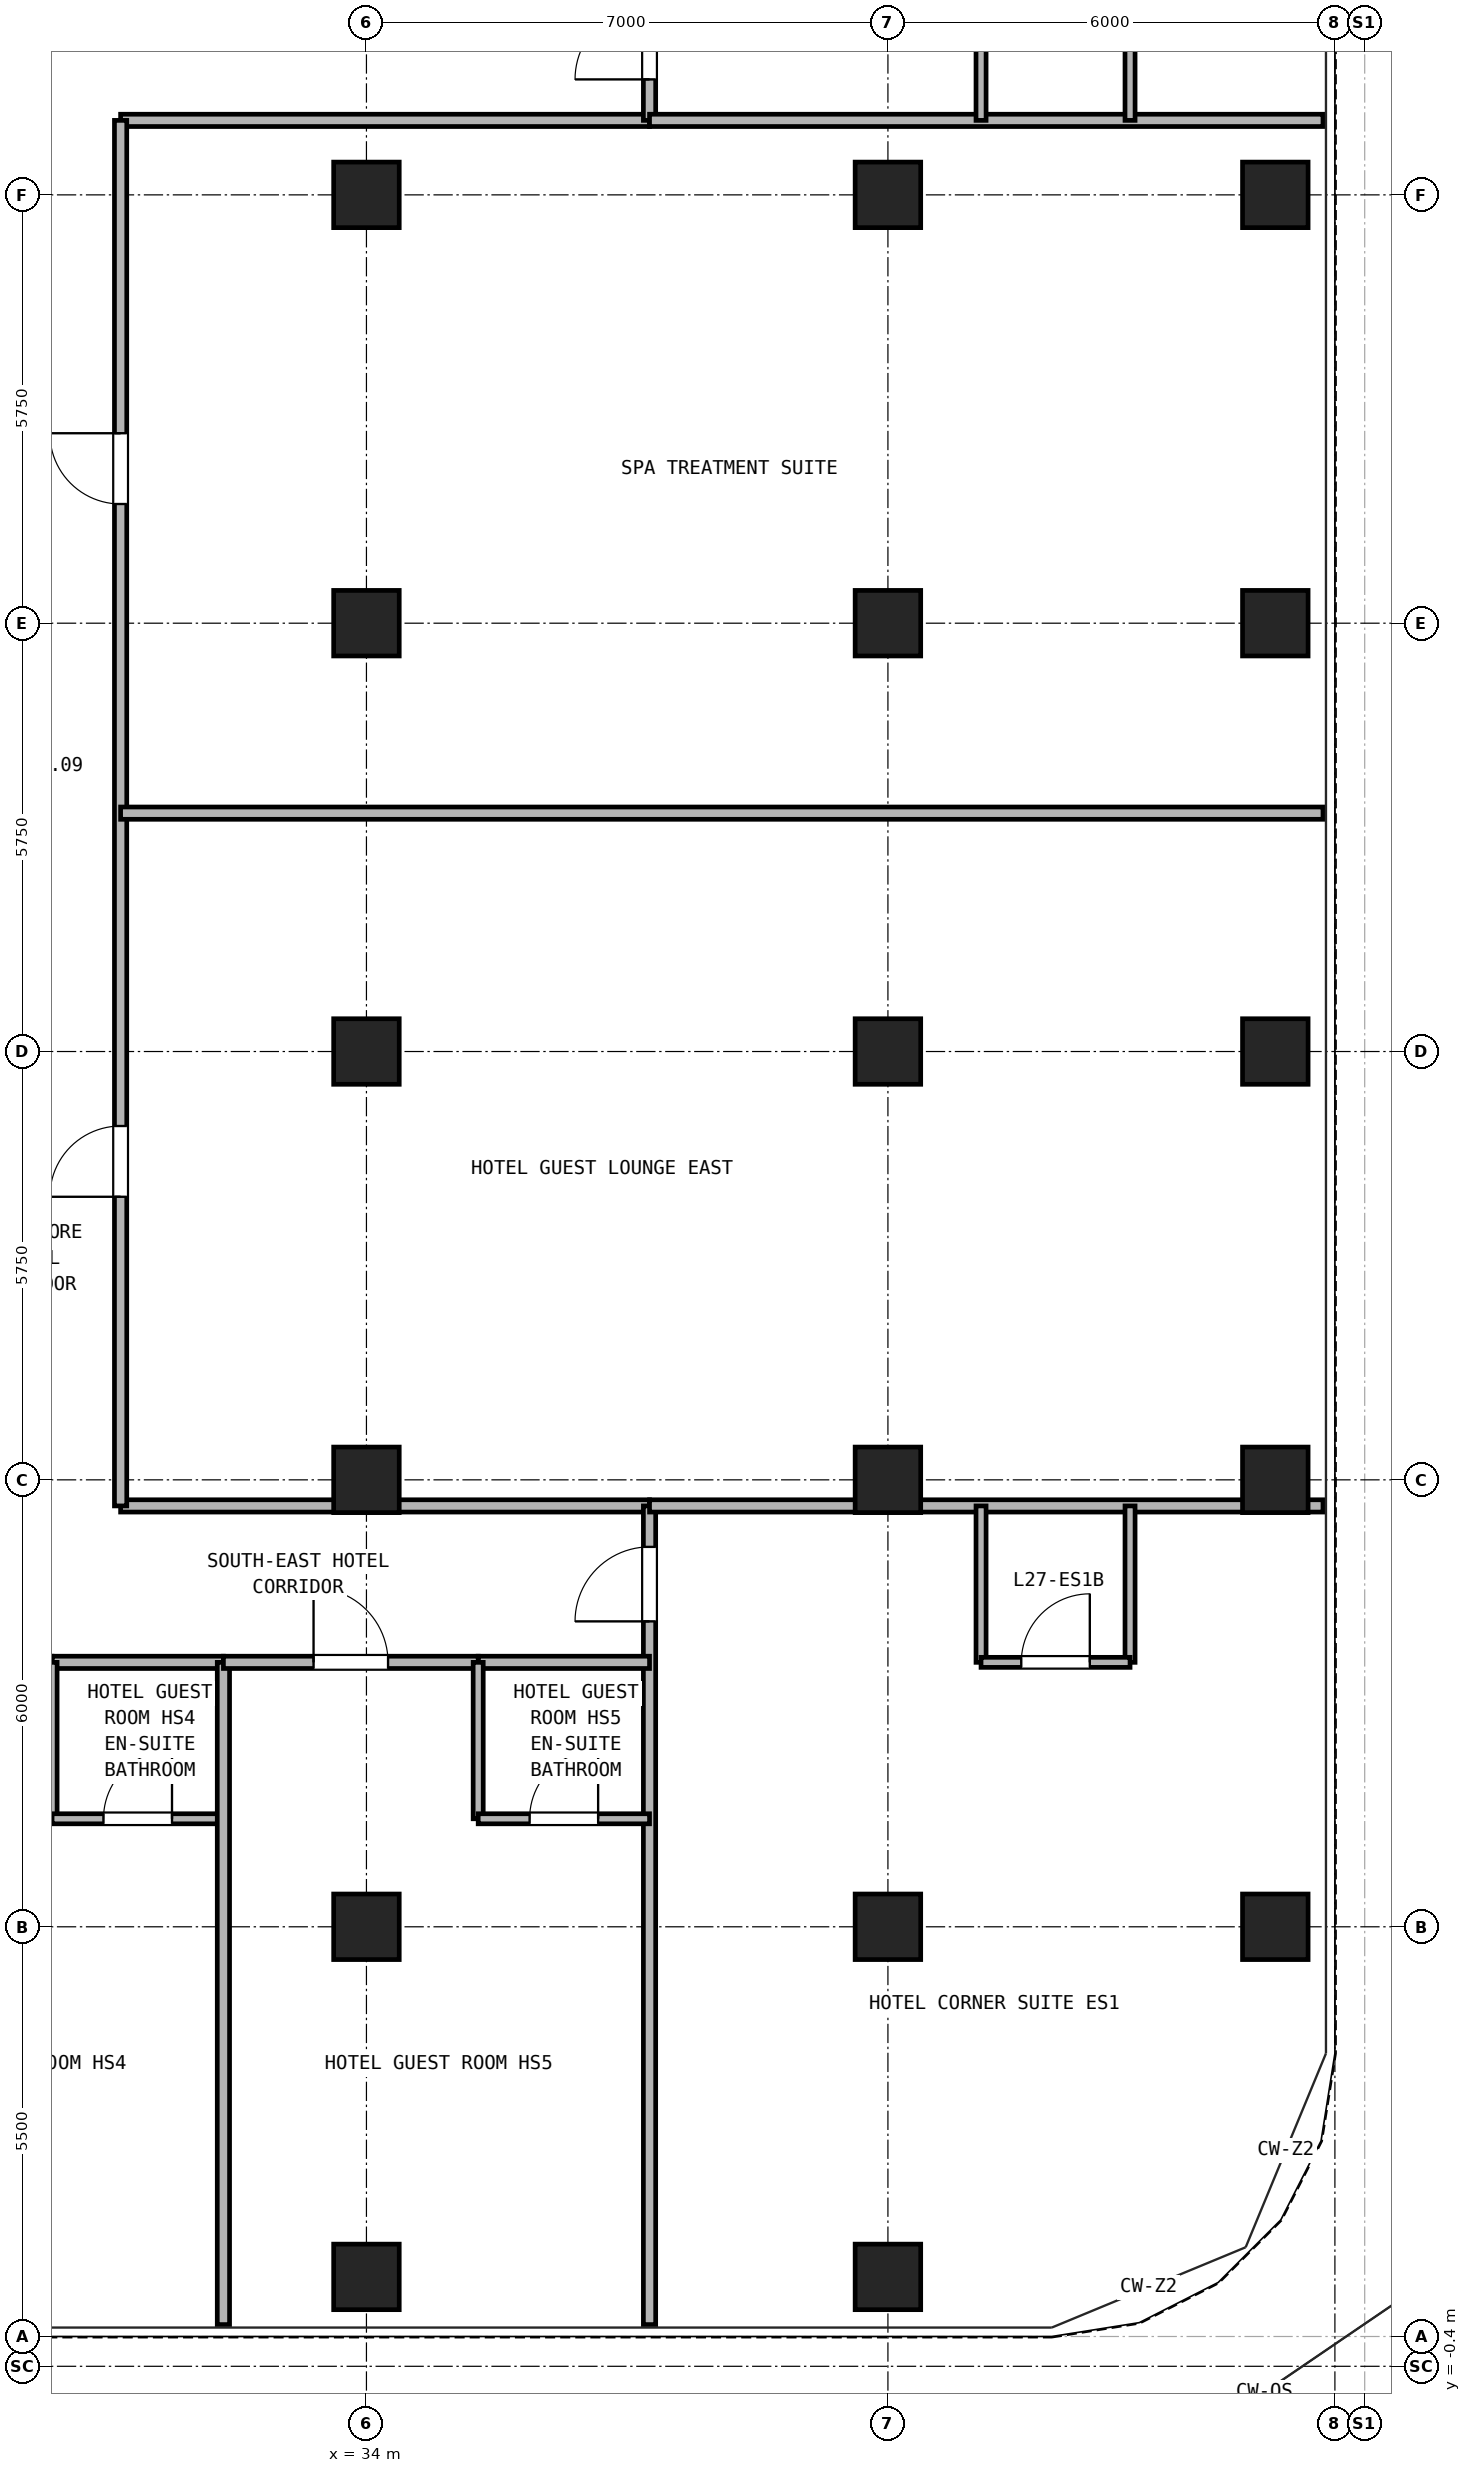
"""IFC4 building model, lengths in metres.
Left out: names, types, materials, properties, quantities, classifications, styles, units other than length and angle.
Written with IfcOpenShell. Run it as: python <this file> out.ifc"""

import sys

from ifc_helpers import new_model, si_unit, direction, frame, frame_2d, origin, origin_2d, place, context, subcontext, project, spatial, rectangle, hollow_rectangle, extrude, source, transform, mapped, element, fill, save


model = new_model("IFC4")
c1 = context("Model", 3, precision=1e-05, world=origin(), true_north=direction((0.0, 1.0)))
c2 = subcontext(c1, "Body", "Model", "MODEL_VIEW")
j1 = project(units=[si_unit("LENGTHUNIT", "METRE"), si_unit("PLANEANGLEUNIT", "RADIAN")], contexts=[c1])
p1 = place(None, origin())
s1 = spatial("IfcSite", under=j1, at=p1, CompositionType="ELEMENT")
p2 = place(p1, origin())
s2 = spatial("IfcBuilding", under=s1, at=p2, CompositionType="ELEMENT")
p3 = place(p2, frame((0.0, 0.0, 102.3)))
s3 = spatial("IfcBuildingStorey", under=s2, at=p3, CompositionType="ELEMENT", Elevation=102.3)
m1 = source(origin(), c2, "Body", "SweptSolid", [
    extrude(hollow_rectangle(XDim=0.88, YDim=0.88, WallThickness=0.05, at=origin_2d()), origin(), (0.0, 0.0, 1.0), 2.95),
])
for number, where, z_axis, x_axis in (
    (1, (34.0, 0.8, 0.0), (0.0, 0.0, 1.0), (1.0, 0.0, 0.0)),
    (2, (41.0, 0.8, 0.0), (0.0, 0.0, 1.0), (1.0, 0.0, 0.0)),
    (3, (46.2, 5.5, 0.0), (0.0, 0.0, 1.0), (1.0, 0.0, 0.0)),
    (4, (46.2, 11.5, 0.0), (0.0, 0.0, 1.0), (1.0, 0.0, 0.0)),
    (5, (46.2, 17.25, 0.0), (0.0, 0.0, 1.0), (1.0, 0.0, 0.0)),
    (6, (46.2, 23.0, 0.0), (0.0, 0.0, 1.0), (1.0, 0.0, 0.0)),
    (7, (46.2, 28.75, 0.0), (0.0, 0.0, 1.0), (1.0, 0.0, 0.0)),
    (8, (34.0, 5.5, 0.0), (0.0, 0.0, 1.0), (1.0, 0.0, 0.0)),
    (9, (34.0, 11.5, 0.0), (0.0, 0.0, 1.0), (1.0, 0.0, 0.0)),
    (10, (34.0, 17.25, 0.0), (0.0, 0.0, 1.0), (1.0, 0.0, 0.0)),
    (11, (34.0, 23.0, 0.0), (0.0, 0.0, 1.0), (1.0, 0.0, 0.0)),
    (12, (34.0, 28.75, 0.0), (0.0, 0.0, 1.0), (1.0, 0.0, 0.0)),
    (13, (41.0, 5.5, 0.0), (0.0, 0.0, 1.0), (1.0, 0.0, 0.0)),
    (14, (41.0, 11.5, 0.0), (0.0, 0.0, 1.0), (1.0, 0.0, 0.0)),
    (15, (41.0, 17.25, 0.0), (0.0, 0.0, 1.0), (1.0, 0.0, 0.0)),
    (16, (41.0, 23.0, 0.0), (0.0, 0.0, 1.0), (1.0, 0.0, 0.0)),
    (17, (41.0, 28.75, 0.0), (0.0, 0.0, 1.0), (1.0, 0.0, 0.0)),
):
    element("IfcColumn", number, at=place(p3, frame(where, z_axis=z_axis, x_axis=x_axis)), inside=s3, PredefinedType="COLUMN", context=c2, shape_type="MappedRepresentation", body=[
        mapped(m1, transform((0.0, 0.0, 0.0), x_axis=(1.0, 0.0, 0.0), y_axis=(0.0, 1.0, 0.0), z_axis=(0.0, 0.0, 1.0), scale=1.0)),
    ])
for number, where, z_axis, x_axis in (
    (18, (30.7, 11.15, 0.0), (0.0, 0.0, 1.0), (1.0, 0.0, 0.0)),
    (19, (30.7, 29.75, 0.0), (0.0, 0.0, 1.0), (1.0, 0.0, 0.0)),
):
    element("IfcWall", number, at=place(p3, frame(where, z_axis=z_axis, x_axis=x_axis)), inside=s3, PredefinedType="PARTITIONING", context=c2, shape_type="SweptSolid", body=[
        extrude(rectangle(XDim=7.1, YDim=0.165, at=frame_2d((3.55, 0.0))), origin(), (0.0, 0.0, 1.0), 2.95),
    ])
p4 = place(p3, frame((30.7, 11.15, 0.0), z_axis=(0.0, 0.0, 1.0), x_axis=(0.0, 1.0, 0.0)))
e20 = element("IfcWall", 20, at=p4, inside=s3, PredefinedType="PARTITIONING", context=c2, shape_type="SweptSolid", body=[
    extrude(rectangle(XDim=18.6, YDim=0.165, at=frame_2d((9.3, 0.0))), origin(), (0.0, 0.0, 1.0), 2.95),
])
p5 = place(p4, frame((4.15, 0.0, 0.0)))
e21 = element("IfcOpeningElement", 21, at=p5, cuts=e20, PredefinedType="OPENING", context=c2, shape_type="SweptSolid", body=[
    extrude(rectangle(XDim=0.95, YDim=2.15, at=frame_2d((0.475, 1.075))), frame((0.0, 0.093, 0.0), z_axis=(0.0, -1.0, 0.0), x_axis=(1.0, 0.0, 0.0)), (0.0, 0.0, 1.0), 0.185),
])
p6 = place(p4, frame((13.45, 0.0, 0.0)))
e22 = element("IfcOpeningElement", 22, at=p6, cuts=e20, PredefinedType="OPENING", context=c2, shape_type="SweptSolid", body=[
    extrude(rectangle(XDim=0.95, YDim=2.15, at=frame_2d((0.475, 1.075))), frame((0.0, 0.093, 0.0), z_axis=(0.0, -1.0, 0.0), x_axis=(1.0, 0.0, 0.0)), (0.0, 0.0, 1.0), 0.185),
])
p7 = place(p3, frame((37.8, 0.16, 0.0), z_axis=(0.0, 0.0, 1.0), x_axis=(0.0, 1.0, 0.0)))
e23 = element("IfcWall", 23, at=p7, inside=s3, PredefinedType="PARTITIONING", context=c2, shape_type="SweptSolid", body=[
    extrude(rectangle(XDim=10.99, YDim=0.165, at=frame_2d((5.495, 0.0))), origin(), (0.0, 0.0, 1.0), 2.95),
])
p8 = place(p7, frame((9.44, 0.0, 0.0)))
e24 = element("IfcOpeningElement", 24, at=p8, cuts=e23, PredefinedType="OPENING", context=c2, shape_type="SweptSolid", body=[
    extrude(rectangle(XDim=1.0, YDim=2.15, at=frame_2d((0.5, 1.075))), frame((0.0, 0.093, 0.0), z_axis=(0.0, -1.0, 0.0), x_axis=(1.0, 0.0, 0.0)), (0.0, 0.0, 1.0), 0.185),
])
p9 = place(p3, frame((37.8, 29.75, 0.0), z_axis=(0.0, 0.0, 1.0), x_axis=(0.0, 1.0, 0.0)))
e25 = element("IfcWall", 25, at=p9, inside=s3, PredefinedType="PARTITIONING", context=c2, shape_type="SweptSolid", body=[
    extrude(rectangle(XDim=5.39, YDim=0.165, at=frame_2d((2.695, 0.0))), origin(), (0.0, 0.0, 1.0), 2.95),
])
p10 = place(p9, frame((0.55, 0.0, 0.0)))
e26 = element("IfcOpeningElement", 26, at=p10, cuts=e25, PredefinedType="OPENING", context=c2, shape_type="SweptSolid", body=[
    extrude(rectangle(XDim=1.0, YDim=2.15, at=frame_2d((0.5, 1.075))), frame((0.0, 0.093, 0.0), z_axis=(0.0, -1.0, 0.0), x_axis=(1.0, 0.0, 0.0)), (0.0, 0.0, 1.0), 0.185),
])
for number, where, z_axis, x_axis in (
    (27, (37.8, 11.15, 0.0), (0.0, 0.0, 1.0), (1.0, 0.0, 0.0)),
    (28, (37.8, 29.75, 0.0), (0.0, 0.0, 1.0), (1.0, 0.0, 0.0)),
):
    element("IfcWall", number, at=place(p3, frame(where, z_axis=z_axis, x_axis=x_axis)), inside=s3, PredefinedType="PARTITIONING", context=c2, shape_type="SweptSolid", body=[
        extrude(rectangle(XDim=9.04, YDim=0.165, at=frame_2d((4.52, 0.0))), origin(), (0.0, 0.0, 1.0), 2.95),
    ])
for number, where, z_axis, x_axis in (
    (29, (42.25, 9.05, 0.0), (0.0, 0.0, 1.0), (0.0, 1.0, 0.0)),
    (30, (44.25, 9.05, 0.0), (0.0, 0.0, 1.0), (0.0, 1.0, 0.0)),
):
    element("IfcWall", number, at=place(p3, frame(where, z_axis=z_axis, x_axis=x_axis)), inside=s3, PredefinedType="PARTITIONING", context=c2, shape_type="SweptSolid", body=[
        extrude(rectangle(XDim=2.1, YDim=0.135, at=frame_2d((1.05, 0.0))), origin(), (0.0, 0.0, 1.0), 2.95),
    ])
p11 = place(p3, frame((42.25, 9.05, 0.0), z_axis=(0.0, 0.0, 1.0), x_axis=(1.0, 0.0, 0.0)))
e31 = element("IfcWall", 31, at=p11, inside=s3, PredefinedType="PARTITIONING", context=c2, shape_type="SweptSolid", body=[
    extrude(rectangle(XDim=2.0, YDim=0.135, at=frame_2d((1.0, 0.0))), origin(), (0.0, 0.0, 1.0), 2.95),
])
p12 = place(p11, frame((0.54, 0.0, 0.0)))
e32 = element("IfcOpeningElement", 32, at=p12, cuts=e31, PredefinedType="OPENING", context=c2, shape_type="SweptSolid", body=[
    extrude(rectangle(XDim=0.92, YDim=2.1, at=frame_2d((0.46, 1.05))), frame((0.0, 0.077, 0.0), z_axis=(0.0, -1.0, 0.0), x_axis=(1.0, 0.0, 0.0)), (0.0, 0.0, 1.0), 0.155),
])
for number, where, z_axis, x_axis in (
    (33, (42.25, 29.75, 0.0), (0.0, 0.0, 1.0), (0.0, 1.0, 0.0)),
    (34, (44.25, 29.75, 0.0), (0.0, 0.0, 1.0), (0.0, 1.0, 0.0)),
):
    element("IfcWall", number, at=place(p3, frame(where, z_axis=z_axis, x_axis=x_axis)), inside=s3, PredefinedType="PARTITIONING", context=c2, shape_type="SweptSolid", body=[
        extrude(rectangle(XDim=2.1, YDim=0.135, at=frame_2d((1.05, 0.0))), origin(), (0.0, 0.0, 1.0), 2.95),
    ])
p13 = place(p3, frame((29.78, 9.05, 0.0), z_axis=(0.0, 0.0, 1.0), x_axis=(1.0, 0.0, 0.0)))
e35 = element("IfcWall", 35, at=p13, inside=s3, PredefinedType="PARTITIONING", context=c2, shape_type="SweptSolid", body=[
    extrude(rectangle(XDim=2.3, YDim=0.165, at=frame_2d((1.15, 0.0))), origin(), (0.0, 0.0, 1.0), 2.95),
])
p14 = place(p3, frame((29.78, 6.95, 0.0), z_axis=(0.0, 0.0, 1.0), x_axis=(0.0, 1.0, 0.0)))
e36 = element("IfcWall", 36, at=p14, inside=s3, PredefinedType="PARTITIONING", context=c2, shape_type="SweptSolid", body=[
    extrude(rectangle(XDim=2.1, YDim=0.135, at=frame_2d((1.05, 0.0))), origin(), (0.0, 0.0, 1.0), 2.95),
])
p15 = place(p3, frame((29.78, 6.95, 0.0), z_axis=(0.0, 0.0, 1.0), x_axis=(1.0, 0.0, 0.0)))
e37 = element("IfcWall", 37, at=p15, inside=s3, PredefinedType="PARTITIONING", context=c2, shape_type="SweptSolid", body=[
    extrude(rectangle(XDim=2.3, YDim=0.135, at=frame_2d((1.15, 0.0))), origin(), (0.0, 0.0, 1.0), 2.95),
])
p16 = place(p15, frame((0.69, 0.0, 0.0)))
e38 = element("IfcOpeningElement", 38, at=p16, cuts=e37, PredefinedType="OPENING", context=c2, shape_type="SweptSolid", body=[
    extrude(rectangle(XDim=0.92, YDim=2.1, at=frame_2d((0.46, 1.05))), frame((0.0, 0.077, 0.0), z_axis=(0.0, -1.0, 0.0), x_axis=(1.0, 0.0, 0.0)), (0.0, 0.0, 1.0), 0.155),
])
p17 = place(p3, frame((32.08, 0.16, 0.0), z_axis=(0.0, 0.0, 1.0), x_axis=(0.0, 1.0, 0.0)))
e39 = element("IfcWall", 39, at=p17, inside=s3, PredefinedType="PARTITIONING", context=c2, shape_type="SweptSolid", body=[
    extrude(rectangle(XDim=8.89, YDim=0.165, at=frame_2d((4.445, 0.0))), origin(), (0.0, 0.0, 1.0), 2.95),
])
p18 = place(p3, frame((35.5, 9.05, 0.0), z_axis=(0.0, 0.0, 1.0), x_axis=(1.0, 0.0, 0.0)))
e40 = element("IfcWall", 40, at=p18, inside=s3, PredefinedType="PARTITIONING", context=c2, shape_type="SweptSolid", body=[
    extrude(rectangle(XDim=2.3, YDim=0.165, at=frame_2d((1.15, 0.0))), origin(), (0.0, 0.0, 1.0), 2.95),
])
p19 = place(p3, frame((32.08, 9.05, 0.0), z_axis=(0.0, 0.0, 1.0), x_axis=(1.0, 0.0, 0.0)))
e41 = element("IfcWall", 41, at=p19, inside=s3, PredefinedType="PARTITIONING", context=c2, shape_type="SweptSolid", body=[
    extrude(rectangle(XDim=3.42, YDim=0.165, at=frame_2d((1.71, 0.0))), origin(), (0.0, 0.0, 1.0), 2.95),
])
p20 = place(p19, frame((1.21, 0.0, 0.0)))
e42 = element("IfcOpeningElement", 42, at=p20, cuts=e41, PredefinedType="OPENING", context=c2, shape_type="SweptSolid", body=[
    extrude(rectangle(XDim=1.0, YDim=2.15, at=frame_2d((0.5, 1.075))), frame((0.0, 0.093, 0.0), z_axis=(0.0, -1.0, 0.0), x_axis=(1.0, 0.0, 0.0)), (0.0, 0.0, 1.0), 0.185),
])
p21 = place(p3, frame((35.5, 6.95, 0.0), z_axis=(0.0, 0.0, 1.0), x_axis=(0.0, 1.0, 0.0)))
e43 = element("IfcWall", 43, at=p21, inside=s3, PredefinedType="PARTITIONING", context=c2, shape_type="SweptSolid", body=[
    extrude(rectangle(XDim=2.1, YDim=0.135, at=frame_2d((1.05, 0.0))), origin(), (0.0, 0.0, 1.0), 2.95),
])
p22 = place(p3, frame((35.5, 6.95, 0.0), z_axis=(0.0, 0.0, 1.0), x_axis=(1.0, 0.0, 0.0)))
e44 = element("IfcWall", 44, at=p22, inside=s3, PredefinedType="PARTITIONING", context=c2, shape_type="SweptSolid", body=[
    extrude(rectangle(XDim=2.3, YDim=0.135, at=frame_2d((1.15, 0.0))), origin(), (0.0, 0.0, 1.0), 2.95),
])
p23 = place(p22, frame((0.69, 0.0, 0.0)))
e45 = element("IfcOpeningElement", 45, at=p23, cuts=e44, PredefinedType="OPENING", context=c2, shape_type="SweptSolid", body=[
    extrude(rectangle(XDim=0.92, YDim=2.1, at=frame_2d((0.46, 1.05))), frame((0.0, 0.077, 0.0), z_axis=(0.0, -1.0, 0.0), x_axis=(1.0, 0.0, 0.0)), (0.0, 0.0, 1.0), 0.155),
])
p24 = place(p3, frame((30.7, 20.45, 0.0), z_axis=(0.0, 0.0, 1.0), x_axis=(1.0, 0.0, 0.0)))
e46 = element("IfcWall", 46, at=p24, inside=s3, PredefinedType="PARTITIONING", context=c2, shape_type="SweptSolid", body=[
    extrude(rectangle(XDim=16.14, YDim=0.165, at=frame_2d((8.07, 0.0))), origin(), (0.0, 0.0, 1.0), 2.95),
])
p25 = place(p12, origin())
e47 = element("IfcDoor", 47, at=p25, inside=s3, OperationType="SINGLE_SWING_RIGHT", PredefinedType="DOOR", context=c2, shape_type="SweptSolid", body=[
    extrude(rectangle(XDim=0.92, YDim=2.1, at=frame_2d((0.46, 1.05))), frame((0.0, 0.025, 0.0), z_axis=(0.0, -1.0, 0.0), x_axis=(1.0, 0.0, 0.0)), (0.0, 0.0, 1.0), 0.05),
])
fill(e32, e47)
p26 = place(p8, frame((1.0, 0.0, 0.0), z_axis=(0.0, 0.0, 1.0), x_axis=(-1.0, 0.0, 0.0)))
e48 = element("IfcDoor", 48, at=p26, inside=s3, OperationType="SINGLE_SWING_LEFT", PredefinedType="DOOR", context=c2, shape_type="SweptSolid", body=[
    extrude(rectangle(XDim=1.0, YDim=2.15, at=frame_2d((0.5, 1.075))), frame((0.0, 0.025, 0.0), z_axis=(0.0, -1.0, 0.0), x_axis=(1.0, 0.0, 0.0)), (0.0, 0.0, 1.0), 0.05),
])
fill(e24, e48)
p27 = place(p10, frame((1.0, 0.0, 0.0), z_axis=(0.0, 0.0, 1.0), x_axis=(-1.0, 0.0, 0.0)))
e49 = element("IfcDoor", 49, at=p27, inside=s3, OperationType="SINGLE_SWING_LEFT", PredefinedType="DOOR", context=c2, shape_type="SweptSolid", body=[
    extrude(rectangle(XDim=1.0, YDim=2.15, at=frame_2d((0.5, 1.075))), frame((0.0, 0.025, 0.0), z_axis=(0.0, -1.0, 0.0), x_axis=(1.0, 0.0, 0.0)), (0.0, 0.0, 1.0), 0.05),
])
fill(e26, e49)
p28 = place(p16, origin())
e50 = element("IfcDoor", 50, at=p28, inside=s3, OperationType="SINGLE_SWING_RIGHT", PredefinedType="DOOR", context=c2, shape_type="SweptSolid", body=[
    extrude(rectangle(XDim=0.92, YDim=2.1, at=frame_2d((0.46, 1.05))), frame((0.0, 0.025, 0.0), z_axis=(0.0, -1.0, 0.0), x_axis=(1.0, 0.0, 0.0)), (0.0, 0.0, 1.0), 0.05),
])
fill(e38, e50)
p29 = place(p23, origin())
e51 = element("IfcDoor", 51, at=p29, inside=s3, OperationType="SINGLE_SWING_RIGHT", PredefinedType="DOOR", context=c2, shape_type="SweptSolid", body=[
    extrude(rectangle(XDim=0.92, YDim=2.1, at=frame_2d((0.46, 1.05))), frame((0.0, 0.025, 0.0), z_axis=(0.0, -1.0, 0.0), x_axis=(1.0, 0.0, 0.0)), (0.0, 0.0, 1.0), 0.05),
])
fill(e45, e51)
p30 = place(p20, frame((1.0, 0.0, 0.0), z_axis=(0.0, 0.0, 1.0), x_axis=(-1.0, 0.0, 0.0)))
e52 = element("IfcDoor", 52, at=p30, inside=s3, OperationType="SINGLE_SWING_LEFT", PredefinedType="DOOR", context=c2, shape_type="SweptSolid", body=[
    extrude(rectangle(XDim=1.0, YDim=2.15, at=frame_2d((0.5, 1.075))), frame((0.0, 0.025, 0.0), z_axis=(0.0, -1.0, 0.0), x_axis=(1.0, 0.0, 0.0)), (0.0, 0.0, 1.0), 0.05),
])
fill(e42, e52)
p31 = place(p5, origin())
e53 = element("IfcDoor", 53, at=p31, inside=s3, OperationType="SINGLE_SWING_LEFT", PredefinedType="DOOR", context=c2, shape_type="SweptSolid", body=[
    extrude(rectangle(XDim=0.95, YDim=2.15, at=frame_2d((0.475, 1.075))), frame((0.0, 0.025, 0.0), z_axis=(0.0, -1.0, 0.0), x_axis=(1.0, 0.0, 0.0)), (0.0, 0.0, 1.0), 0.05),
])
fill(e21, e53)
p32 = place(p6, origin())
e54 = element("IfcDoor", 54, at=p32, inside=s3, OperationType="SINGLE_SWING_RIGHT", PredefinedType="DOOR", context=c2, shape_type="SweptSolid", body=[
    extrude(rectangle(XDim=0.95, YDim=2.15, at=frame_2d((0.475, 1.075))), frame((0.0, 0.025, 0.0), z_axis=(0.0, -1.0, 0.0), x_axis=(1.0, 0.0, 0.0)), (0.0, 0.0, 1.0), 0.05),
])
fill(e22, e54)
save(model, sys.argv[1])
